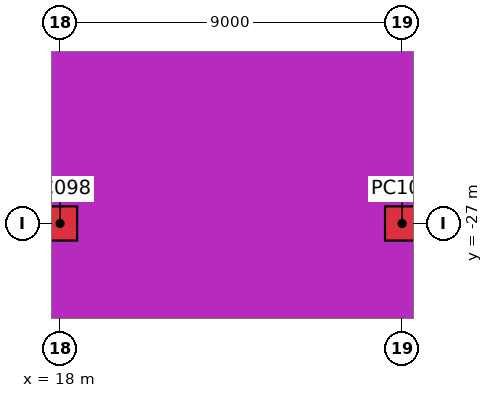
"""IFC4 building model, lengths in metres.
Left out: names, types, materials, properties, quantities, classifications, styles, units other than length and angle.
Written with IfcOpenShell. Run it as: python <this file> out.ifc"""

import sys

from ifc_helpers import new_model, si_unit, direction, frame, origin, origin_2d, place, context, subcontext, project, spatial, rectangle, extrude, element, save


model = new_model("IFC4")
c1 = context("Model", 3, precision=1e-05, world=origin(), true_north=direction((0.0, 1.0)))
c2 = subcontext(c1, "Body", "Model", "MODEL_VIEW")
j1 = project(units=[si_unit("LENGTHUNIT", "METRE"), si_unit("PLANEANGLEUNIT", "RADIAN")], contexts=[c1])
p1 = place(None, origin())
s1 = spatial("IfcSite", under=j1, at=p1, CompositionType="ELEMENT")
p2 = place(p1, origin())
s2 = spatial("IfcBuilding", under=s1, at=p2, CompositionType="ELEMENT")
p3 = place(p2, frame((0.0, 0.0, -4.5)))
s3 = spatial("IfcBuildingStorey", under=s2, at=p3, CompositionType="ELEMENT", Elevation=-4.5)
for number, where, z_axis, x_axis in (
    (1, (18.0, -27.0, 0.0), (0.0, 0.0, 1.0), (1.0, 0.0, 0.0)),
    (2, (27.0, -27.0, 0.0), (0.0, 0.0, 1.0), (1.0, 0.0, 0.0)),
):
    element("IfcColumn", number, at=place(p3, frame(where, z_axis=z_axis, x_axis=x_axis)), inside=s3, PredefinedType="COLUMN", context=c2, shape_type="SweptSolid", body=[
        extrude(rectangle(XDim=0.9, YDim=0.9, at=origin_2d()), origin(), (0.0, 0.0, 1.0), 3.9),
    ])
save(model, sys.argv[1])
